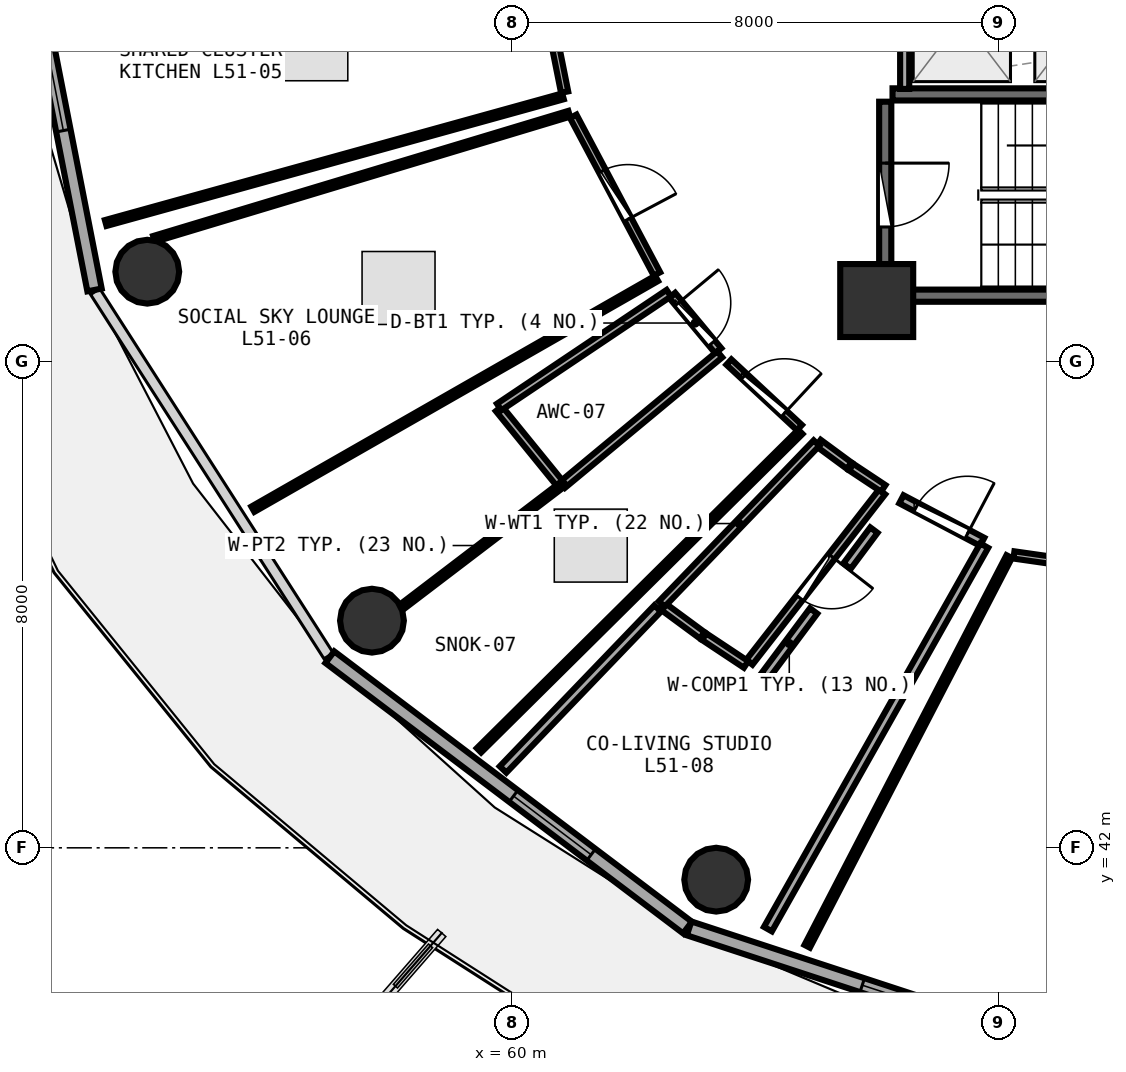
"""IFC4 building model, lengths in metres.
Left out: names, types, materials, properties, quantities, classifications, styles, units other than length and angle.
Written with IfcOpenShell. Run it as: python <this file> out.ifc"""

import sys

from ifc_helpers import new_model, si_unit, direction, frame, frame_2d, origin, origin_2d, place, context, subcontext, project, spatial, rectangle, circle, extrude, element, fill, save


model = new_model("IFC4")
c1 = context("Model", 3, precision=1e-05, world=origin(), true_north=direction((0.0, 1.0)))
c2 = subcontext(c1, "Body", "Model", "MODEL_VIEW")
j1 = project(units=[si_unit("LENGTHUNIT", "METRE"), si_unit("PLANEANGLEUNIT", "RADIAN")], contexts=[c1])
p1 = place(None, origin())
s1 = spatial("IfcSite", under=j1, at=p1, CompositionType="ELEMENT")
p2 = place(p1, origin())
s2 = spatial("IfcBuilding", under=s1, at=p2, CompositionType="ELEMENT")
p3 = place(p2, frame((0.0, 0.0, 200.7)))
s3 = spatial("IfcBuildingStorey", under=s2, at=p3, CompositionType="ELEMENT", Elevation=200.7)
p4 = place(p3, frame((66.0, 51.0, 0.0), z_axis=(0.0, 0.0, 1.0), x_axis=(1.0, 0.0, 0.0)))
e1 = element("IfcColumn", 1, at=p4, inside=s3, PredefinedType="PILASTER", context=c2, shape_type="SweptSolid", body=[
    extrude(rectangle(XDim=1.2, YDim=1.2, at=origin_2d()), origin(), (0.0, 0.0, 1.0), 3.75),
])
for number, where, z_axis, x_axis in (
    (2, (54.003, 51.474, 0.0), (0.0, 0.0, 1.0), (1.0, 0.0, 0.0)),
    (3, (57.698, 45.736, 0.0), (0.0, 0.0, 1.0), (1.0, 0.0, 0.0)),
    (4, (63.36, 41.476, 0.0), (0.0, 0.0, 1.0), (1.0, 0.0, 0.0)),
):
    element("IfcColumn", number, at=place(p3, frame(where, z_axis=z_axis, x_axis=x_axis)), inside=s3, PredefinedType="COLUMN", context=c2, shape_type="SweptSolid", body=[
        extrude(circle(Radius=0.525, at=origin_2d()), origin(), (0.0, 0.0, 1.0), 3.75),
    ])
p5 = place(p3, frame((51.803, 57.985, 0.0), z_axis=(0.0, 0.0, 1.0), x_axis=(0.192069055673, -0.981381413036, 0.0)))
e5 = element("IfcWall", 5, at=p5, inside=s3, PredefinedType="SOLIDWALL", context=c2, shape_type="SweptSolid", body=[
    extrude(rectangle(XDim=6.94, YDim=0.24, at=frame_2d((3.47, 0.0))), origin(), (0.0, 0.0, 1.0), 3.475),
])
p6 = place(p5, frame((2.67, 0.0, 0.85)))
e6 = element("IfcOpeningElement", 6, at=p6, cuts=e5, PredefinedType="OPENING", context=c2, shape_type="SweptSolid", body=[
    extrude(rectangle(XDim=1.6, YDim=1.45, at=frame_2d((0.8, 0.725))), frame((0.0, 0.13, 0.0), z_axis=(0.0, -1.0, 0.0), x_axis=(1.0, 0.0, 0.0)), (0.0, 0.0, 1.0), 0.26),
])
p7 = place(p3, frame((57.006, 45.135, 0.0), z_axis=(0.0, 0.0, 1.0), x_axis=(0.797701674595, -0.603052268338, 0.0)))
e7 = element("IfcWall", 7, at=p7, inside=s3, PredefinedType="SOLIDWALL", context=c2, shape_type="SweptSolid", body=[
    extrude(rectangle(XDim=7.374, YDim=0.24, at=frame_2d((3.687, 0.0))), origin(), (0.0, 0.0, 1.0), 3.475),
])
p8 = place(p7, frame((3.787, 0.0, 0.85)))
e8 = element("IfcOpeningElement", 8, at=p8, cuts=e7, PredefinedType="OPENING", context=c2, shape_type="SweptSolid", body=[
    extrude(rectangle(XDim=1.6, YDim=1.45, at=frame_2d((0.8, 0.725))), frame((0.0, 0.13, 0.0), z_axis=(0.0, -1.0, 0.0), x_axis=(1.0, 0.0, 0.0)), (0.0, 0.0, 1.0), 0.26),
])
p9 = place(p3, frame((62.914, 40.675, 0.0), z_axis=(0.0, 0.0, 1.0), x_axis=(0.95022142767, -0.31157541366, 0.0)))
e9 = element("IfcWall", 9, at=p9, inside=s3, PredefinedType="SOLIDWALL", context=c2, shape_type="SweptSolid", body=[
    extrude(rectangle(XDim=7.594, YDim=0.24, at=frame_2d((3.797, 0.0))), origin(), (0.0, 0.0, 1.0), 3.475),
])
p10 = place(p9, frame((2.997, 0.0, 0.85)))
e10 = element("IfcOpeningElement", 10, at=p10, cuts=e9, PredefinedType="OPENING", context=c2, shape_type="SweptSolid", body=[
    extrude(rectangle(XDim=1.6, YDim=1.45, at=frame_2d((0.8, 0.725))), frame((0.0, 0.13, 0.0), z_axis=(0.0, -1.0, 0.0), x_axis=(1.0, 0.0, 0.0)), (0.0, 0.0, 1.0), 0.26),
])
for number, where, z_axis, x_axis in (
    (11, (66.26, 51.08, 0.0), (0.0, 0.0, 1.0), (1.0, 0.0, 0.0)),
    (12, (73.42, 54.39, 0.0), (0.0, 0.0, 1.0), (-1.0, 0.0, 0.0)),
):
    element("IfcWall", number, at=place(p3, frame(where, z_axis=z_axis, x_axis=x_axis)), inside=s3, PredefinedType="SHEAR", context=c2, shape_type="SweptSolid", body=[
        extrude(rectangle(XDim=7.16, YDim=0.2, at=frame_2d((3.58, 0.0))), origin(), (0.0, 0.0, 1.0), 3.49),
    ])
p11 = place(p3, frame((66.14, 54.27, 0.0), z_axis=(0.0, 0.0, 1.0), x_axis=(0.0, -1.0, 0.0)))
e13 = element("IfcWall", 13, at=p11, inside=s3, PredefinedType="SHEAR", context=c2, shape_type="SweptSolid", body=[
    extrude(rectangle(XDim=3.07, YDim=0.2, at=frame_2d((1.535, 0.0))), origin(), (0.0, 0.0, 1.0), 3.49),
])
p12 = place(p11, frame((1.01, 0.0, 0.0)))
e14 = element("IfcOpeningElement", 14, at=p12, cuts=e13, PredefinedType="OPENING", context=c2, shape_type="SweptSolid", body=[
    extrude(rectangle(XDim=1.05, YDim=2.1, at=frame_2d((0.525, 1.05))), frame((0.0, 0.11, 0.0), z_axis=(0.0, -1.0, 0.0), x_axis=(1.0, 0.0, 0.0)), (0.0, 0.0, 1.0), 0.22),
])
p13 = place(p3, frame((66.46, 54.48, 0.0), z_axis=(0.0, 0.0, 1.0), x_axis=(0.0, 1.0, 0.0)))
e15 = element("IfcWall", 15, at=p13, inside=s3, PredefinedType="PARTITIONING", context=c2, shape_type="SweptSolid", body=[
    extrude(rectangle(XDim=2.29, YDim=0.15, at=frame_2d((1.145, 0.0))), origin(), (0.0, 0.0, 1.0), 3.48),
])
p14 = place(p3, frame((68.256, 46.816, 0.0), z_axis=(0.0, 0.0, 1.0), x_axis=(0.989926410659, -0.141582843167, 0.0)))
e16 = element("IfcWall", 16, at=p14, inside=s3, PredefinedType="PARTITIONING", context=c2, shape_type="SweptSolid", body=[
    extrude(rectangle(XDim=7.408, YDim=0.12, at=frame_2d((3.704, 0.0))), origin(), (0.0, 0.0, 1.0), 3.025),
])
p15 = place(p14, frame((3.254, 0.0, 0.0)))
e17 = element("IfcOpeningElement", 17, at=p15, cuts=e16, PredefinedType="OPENING", context=c2, shape_type="SweptSolid", body=[
    extrude(rectangle(XDim=0.9, YDim=2.08, at=frame_2d((0.45, 1.04))), frame((0.0, 0.07, 0.0), z_axis=(0.0, -1.0, 0.0), x_axis=(1.0, 0.0, 0.0)), (0.0, 0.0, 1.0), 0.14),
])
p16 = place(p3, frame((60.303, 57.253, 0.0), z_axis=(0.0, 0.0, 1.0), x_axis=(0.195904296331, -0.980623019656, 0.0)))
e18 = element("IfcWall", 18, at=p16, inside=s3, PredefinedType="PARTITIONING", context=c2, shape_type="SweptSolid", body=[
    extrude(rectangle(XDim=2.881, YDim=0.12, at=frame_2d((1.441, 0.0))), origin(), (0.0, 0.0, 1.0), 3.48),
])
p17 = place(p16, frame((0.991, 0.0, 0.0)))
e19 = element("IfcOpeningElement", 19, at=p17, cuts=e18, PredefinedType="OPENING", context=c2, shape_type="SweptSolid", body=[
    extrude(rectangle(XDim=0.9, YDim=2.08, at=frame_2d((0.45, 1.04))), frame((0.0, 0.07, 0.0), z_axis=(0.0, -1.0, 0.0), x_axis=(1.0, 0.0, 0.0)), (0.0, 0.0, 1.0), 0.14),
])
p18 = place(p3, frame((61.009, 54.03, 0.0), z_axis=(0.0, 0.0, 1.0), x_axis=(0.468999166779, -0.883198608219, 0.0)))
e20 = element("IfcWall", 20, at=p18, inside=s3, PredefinedType="PARTITIONING", context=c2, shape_type="SweptSolid", body=[
    extrude(rectangle(XDim=2.936, YDim=0.12, at=frame_2d((1.468, 0.0))), origin(), (0.0, 0.0, 1.0), 3.235),
])
p19 = place(p18, frame((1.018, 0.0, 0.0)))
e21 = element("IfcOpeningElement", 21, at=p19, cuts=e20, PredefinedType="OPENING", context=c2, shape_type="SweptSolid", body=[
    extrude(rectangle(XDim=0.9, YDim=2.08, at=frame_2d((0.45, 1.04))), frame((0.0, 0.07, 0.0), z_axis=(0.0, -1.0, 0.0), x_axis=(1.0, 0.0, 0.0)), (0.0, 0.0, 1.0), 0.14),
])
p20 = place(p3, frame((62.635, 51.086, 0.0), z_axis=(0.0, 0.0, 1.0), x_axis=(0.639759255057, -0.768575367526, 0.0)))
e22 = element("IfcWall", 22, at=p20, inside=s3, PredefinedType="PLUMBINGWALL", context=c2, shape_type="SweptSolid", body=[
    extrude(rectangle(XDim=1.187, YDim=0.13, at=frame_2d((0.593, 0.0))), origin(), (0.0, 0.0, 1.0), 3.025),
])
p21 = place(p20, frame((0.163, 0.0, 0.0)))
e23 = element("IfcOpeningElement", 23, at=p21, cuts=e22, PredefinedType="OPENING", context=c2, shape_type="SweptSolid", body=[
    extrude(rectangle(XDim=0.86, YDim=2.05, at=frame_2d((0.43, 1.025))), frame((0.0, 0.075, 0.0), z_axis=(0.0, -1.0, 0.0), x_axis=(1.0, 0.0, 0.0)), (0.0, 0.0, 1.0), 0.15),
])
p22 = place(p3, frame((63.569, 49.988, 0.0), z_axis=(0.0, 0.0, 1.0), x_axis=(0.732453034456, -0.680817561698, 0.0)))
e24 = element("IfcWall", 24, at=p22, inside=s3, PredefinedType="PARTITIONING", context=c2, shape_type="SweptSolid", body=[
    extrude(rectangle(XDim=1.584, YDim=0.12, at=frame_2d((0.792, 0.0))), origin(), (0.0, 0.0, 1.0), 3.025),
])
p23 = place(p22, frame((0.342, 0.0, 0.0)))
e25 = element("IfcOpeningElement", 25, at=p23, cuts=e24, PredefinedType="OPENING", context=c2, shape_type="SweptSolid", body=[
    extrude(rectangle(XDim=0.9, YDim=2.08, at=frame_2d((0.45, 1.04))), frame((0.0, 0.07, 0.0), z_axis=(0.0, -1.0, 0.0), x_axis=(1.0, 0.0, 0.0)), (0.0, 0.0, 1.0), 0.14),
])
p24 = place(p3, frame((66.088, 47.853, 0.0), z_axis=(0.0, 0.0, 1.0), x_axis=(-0.614711227896, -0.788752246462, 0.0)))
e26 = element("IfcWall", 26, at=p24, inside=s3, PredefinedType="PLUMBINGWALL", context=c2, shape_type="SweptSolid", body=[
    extrude(rectangle(XDim=3.552, YDim=0.13, at=frame_2d((1.776, 0.0))), origin(), (0.0, 0.0, 1.0), 3.025),
])
p25 = place(p24, frame((1.346, 0.0, 0.0)))
e27 = element("IfcOpeningElement", 27, at=p25, cuts=e26, PredefinedType="OPENING", context=c2, shape_type="SweptSolid", body=[
    extrude(rectangle(XDim=0.86, YDim=2.05, at=frame_2d((0.43, 1.025))), frame((0.0, 0.075, 0.0), z_axis=(0.0, -1.0, 0.0), x_axis=(1.0, 0.0, 0.0)), (0.0, 0.0, 1.0), 0.15),
])
p26 = place(p3, frame((66.406, 47.732, 0.0), z_axis=(0.0, 0.0, 1.0), x_axis=(0.884766555002, -0.466034487083, 0.0)))
e28 = element("IfcWall", 28, at=p26, inside=s3, PredefinedType="PARTITIONING", context=c2, shape_type="SweptSolid", body=[
    extrude(rectangle(XDim=1.502, YDim=0.15, at=frame_2d((0.751, 0.0))), origin(), (0.0, 0.0, 1.0), 3.235),
])
p27 = place(p26, frame((0.276, 0.0, 0.0)))
e29 = element("IfcOpeningElement", 29, at=p27, cuts=e28, PredefinedType="OPENING", context=c2, shape_type="SweptSolid", body=[
    extrude(rectangle(XDim=0.95, YDim=2.08, at=frame_2d((0.475, 1.04))), frame((0.0, 0.085, 0.0), z_axis=(0.0, -1.0, 0.0), x_axis=(1.0, 0.0, 0.0)), (0.0, 0.0, 1.0), 0.17),
])
p28 = place(p3, frame((64.856, 40.381, 0.0), z_axis=(0.0, 0.0, 1.0), x_axis=(0.460220418691, 0.887804689231, 0.0)))
e30 = element("IfcWall", 30, at=p28, inside=s3, PredefinedType="PARTITIONING", context=c2, shape_type="SweptSolid", body=[
    extrude(rectangle(XDim=7.219, YDim=0.1, at=frame_2d((3.609, 0.0))), origin(), (0.0, 0.0, 1.0), 3.075),
])
p29 = place(p3, frame((60.841, 54.358, 0.0), z_axis=(0.0, 0.0, 1.0), x_axis=(-0.963696964369, -0.266998428582, 0.0)))
e31 = element("IfcWall", 31, at=p29, inside=s3, PredefinedType="PARTITIONING", context=c2, shape_type="SweptSolid", body=[
    extrude(rectangle(XDim=7.804, YDim=0.1, at=frame_2d((3.902, 0.0))), origin(), (0.0, 0.0, 1.0), 3.075),
])
p30 = place(p3, frame((62.379, 51.364, 0.0), z_axis=(0.0, 0.0, 1.0), x_axis=(-0.868127220156, -0.496341746808, 0.0)))
e32 = element("IfcWall", 32, at=p30, inside=s3, PredefinedType="PARTITIONING", context=c2, shape_type="SweptSolid", body=[
    extrude(rectangle(XDim=7.648, YDim=0.1, at=frame_2d((3.824, 0.0))), origin(), (0.0, 0.0, 1.0), 3.025),
])
p31 = place(p3, frame((54.114, 52.013, 0.0), z_axis=(0.0, 0.0, 1.0), x_axis=(0.957454305291, 0.288584915198, 0.0)))
e33 = element("IfcWall", 33, at=p31, inside=s3, PredefinedType="PARTITIONING", context=c2, shape_type="SweptSolid", body=[
    extrude(rectangle(XDim=7.133, YDim=0.1, at=frame_2d((3.566, 0.0))), origin(), (0.0, 0.0, 1.0), 3.075),
])
p32 = place(p3, frame((63.417, 50.115, 0.0), z_axis=(0.0, 0.0, 1.0), x_axis=(-0.76963081868, -0.638489156477, 0.0)))
e34 = element("IfcWall", 34, at=p32, inside=s3, PredefinedType="PLUMBINGWALL", context=c2, shape_type="SweptSolid", body=[
    extrude(rectangle(XDim=3.36, YDim=0.13, at=frame_2d((1.68, 0.0))), origin(), (0.0, 0.0, 1.0), 3.175),
])
p33 = place(p3, frame((60.803, 47.972, 0.0), z_axis=(0.0, 0.0, 1.0), x_axis=(-0.631048835574, 0.775743106396, 0.0)))
e35 = element("IfcWall", 35, at=p33, inside=s3, PredefinedType="PLUMBINGWALL", context=c2, shape_type="SweptSolid", body=[
    extrude(rectangle(XDim=1.611, YDim=0.13, at=frame_2d((0.806, 0.0))), origin(), (0.0, 0.0, 1.0), 3.175),
])
p34 = place(p3, frame((59.791, 49.249, 0.0), z_axis=(0.0, 0.0, 1.0), x_axis=(0.830403176275, 0.557162960751, 0.0)))
e36 = element("IfcWall", 36, at=p34, inside=s3, PredefinedType="PLUMBINGWALL", context=c2, shape_type="SweptSolid", body=[
    extrude(rectangle(XDim=3.36, YDim=0.13, at=frame_2d((1.68, 0.0))), origin(), (0.0, 0.0, 1.0), 3.025),
])
p35 = place(p3, frame((64.745, 48.841, 0.0), z_axis=(0.0, 0.0, 1.0), x_axis=(-0.710363664194, -0.703834827635, 0.0)))
e37 = element("IfcWall", 37, at=p35, inside=s3, PredefinedType="PARTITIONING", context=c2, shape_type="SweptSolid", body=[
    extrude(rectangle(XDim=7.441, YDim=0.1, at=frame_2d((3.721, 0.0))), origin(), (0.0, 0.0, 1.0), 3.075),
])
p36 = place(p3, frame((58.197, 45.969, 0.0), z_axis=(0.0, 0.0, 1.0), x_axis=(0.79535379018, 0.606145484555, 0.0)))
e38 = element("IfcWall", 38, at=p36, inside=s3, PredefinedType="PARTITIONING", context=c2, shape_type="SweptSolid", body=[
    extrude(rectangle(XDim=3.308, YDim=0.1, at=frame_2d((1.654, 0.0))), origin(), (0.0, 0.0, 1.0), 3.025),
])
p37 = place(p3, frame((65.04, 48.658, 0.0), z_axis=(0.0, 0.0, 1.0), x_axis=(0.804987739936, -0.593291444867, 0.0)))
e39 = element("IfcWall", 39, at=p37, inside=s3, PredefinedType="PLUMBINGWALL", context=c2, shape_type="SweptSolid", body=[
    extrude(rectangle(XDim=0.631, YDim=0.13, at=frame_2d((0.315, 0.0))), origin(), (0.0, 0.0, 1.0), 3.025),
])
p38 = place(p3, frame((65.581, 48.261, 0.0), z_axis=(0.0, 0.0, 1.0), x_axis=(0.83341242139, -0.55265155014, 0.0)))
e40 = element("IfcWall", 40, at=p38, inside=s3, PredefinedType="PLUMBINGWALL", context=c2, shape_type="SweptSolid", body=[
    extrude(rectangle(XDim=0.633, YDim=0.13, at=frame_2d((0.316, 0.0))), origin(), (0.0, 0.0, 1.0), 3.48),
])
p39 = place(p3, frame((63.851, 45.015, 0.0), z_axis=(0.0, 0.0, 1.0), x_axis=(-0.833365951339, 0.552721621749, 0.0)))
e41 = element("IfcWall", 41, at=p39, inside=s3, PredefinedType="PLUMBINGWALL", context=c2, shape_type="SweptSolid", body=[
    extrude(rectangle(XDim=0.826, YDim=0.13, at=frame_2d((0.413, 0.0))), origin(), (0.0, 0.0, 1.0), 3.48),
])
p40 = place(p3, frame((63.13, 45.495, 0.0), z_axis=(0.0, 0.0, 1.0), x_axis=(-0.805130367536, 0.593097876638, 0.0)))
e42 = element("IfcWall", 42, at=p40, inside=s3, PredefinedType="PLUMBINGWALL", context=c2, shape_type="SweptSolid", body=[
    extrude(rectangle(XDim=0.823, YDim=0.13, at=frame_2d((0.412, 0.0))), origin(), (0.0, 0.0, 1.0), 3.48),
])
p41 = place(p3, frame((62.465, 46.01, 0.0), z_axis=(0.0, 0.0, 1.0), x_axis=(0.693241598237, 0.720705270186, 0.0)))
e43 = element("IfcWall", 43, at=p41, inside=s3, PredefinedType="PLUMBINGWALL", context=c2, shape_type="SweptSolid", body=[
    extrude(rectangle(XDim=3.671, YDim=0.13, at=frame_2d((1.836, 0.0))), origin(), (0.0, 0.0, 1.0), 3.175),
])
p42 = place(p3, frame((67.768, 46.969, 0.0), z_axis=(0.0, 0.0, 1.0), x_axis=(-0.491338239217, -0.870968848285, 0.0)))
e44 = element("IfcWall", 44, at=p42, inside=s3, PredefinedType="PARTITIONING", context=c2, shape_type="SweptSolid", body=[
    extrude(rectangle(XDim=7.241, YDim=0.15, at=frame_2d((3.62, 0.0))), origin(), (0.0, 0.0, 1.0), 3.075),
])
p43 = place(p3, frame((59.855, 43.288, 0.0), z_axis=(0.0, 0.0, 1.0), x_axis=(0.692562282737, 0.72135808343, 0.0)))
e45 = element("IfcWall", 45, at=p43, inside=s3, PredefinedType="PARTITIONING", context=c2, shape_type="SweptSolid", body=[
    extrude(rectangle(XDim=3.671, YDim=0.15, at=frame_2d((1.835, 0.0))), origin(), (0.0, 0.0, 1.0), 3.075),
])
p44 = place(p3, frame((64.162, 44.823, 0.0), z_axis=(0.0, 0.0, 1.0), x_axis=(0.597925227294, 0.801551883889, 0.0)))
e46 = element("IfcWall", 46, at=p44, inside=s3, PredefinedType="PARTITIONING", context=c2, shape_type="SweptSolid", body=[
    extrude(rectangle(XDim=1.338, YDim=0.15, at=frame_2d((0.669, 0.0))), origin(), (0.0, 0.0, 1.0), 3.025),
])
p45 = place(p3, frame((65.512, 46.633, 0.0), z_axis=(0.0, 0.0, 1.0), x_axis=(0.598093921347, 0.801426017327, 0.0)))
e47 = element("IfcWall", 47, at=p45, inside=s3, PredefinedType="PARTITIONING", context=c2, shape_type="SweptSolid", body=[
    extrude(rectangle(XDim=0.739, YDim=0.15, at=frame_2d((0.369, 0.0))), origin(), (0.0, 0.0, 1.0), 3.235),
])
p46 = place(p6, origin())
e48 = element("IfcWindow", 48, at=p46, inside=s3, PartitioningType="SINGLE_PANEL", PredefinedType="WINDOW", context=c2, shape_type="SweptSolid", body=[
    extrude(rectangle(XDim=1.6, YDim=1.45, at=frame_2d((0.8, 0.725))), frame((0.0, 0.03, 0.0), z_axis=(0.0, -1.0, 0.0), x_axis=(1.0, 0.0, 0.0)), (0.0, 0.0, 1.0), 0.06),
])
fill(e6, e48)
p47 = place(p8, origin())
e49 = element("IfcWindow", 49, at=p47, inside=s3, PartitioningType="SINGLE_PANEL", PredefinedType="WINDOW", context=c2, shape_type="SweptSolid", body=[
    extrude(rectangle(XDim=1.6, YDim=1.45, at=frame_2d((0.8, 0.725))), frame((0.0, 0.03, 0.0), z_axis=(0.0, -1.0, 0.0), x_axis=(1.0, 0.0, 0.0)), (0.0, 0.0, 1.0), 0.06),
])
fill(e8, e49)
p48 = place(p10, origin())
e50 = element("IfcWindow", 50, at=p48, inside=s3, PartitioningType="SINGLE_PANEL", PredefinedType="WINDOW", context=c2, shape_type="SweptSolid", body=[
    extrude(rectangle(XDim=1.6, YDim=1.45, at=frame_2d((0.8, 0.725))), frame((0.0, 0.03, 0.0), z_axis=(0.0, -1.0, 0.0), x_axis=(1.0, 0.0, 0.0)), (0.0, 0.0, 1.0), 0.06),
])
fill(e10, e50)
p49 = place(p12, origin())
e51 = element("IfcDoor", 51, at=p49, inside=s3, OperationType="SINGLE_SWING_LEFT", PredefinedType="DOOR", context=c2, shape_type="SweptSolid", body=[
    extrude(rectangle(XDim=1.05, YDim=2.1, at=frame_2d((0.525, 1.05))), frame((0.0, 0.025, 0.0), z_axis=(0.0, -1.0, 0.0), x_axis=(1.0, 0.0, 0.0)), (0.0, 0.0, 1.0), 0.05),
])
fill(e14, e51)
p50 = place(p19, origin())
e52 = element("IfcDoor", 52, at=p50, inside=s3, OperationType="SINGLE_SWING_RIGHT", PredefinedType="DOOR", context=c2, shape_type="SweptSolid", body=[
    extrude(rectangle(XDim=0.9, YDim=2.08, at=frame_2d((0.45, 1.04))), frame((0.0, 0.025, 0.0), z_axis=(0.0, -1.0, 0.0), x_axis=(1.0, 0.0, 0.0)), (0.0, 0.0, 1.0), 0.05),
])
fill(e21, e52)
p51 = place(p21, origin())
e53 = element("IfcDoor", 53, at=p51, inside=s3, OperationType="SINGLE_SWING_LEFT", PredefinedType="DOOR", context=c2, shape_type="SweptSolid", body=[
    extrude(rectangle(XDim=0.86, YDim=2.05, at=frame_2d((0.43, 1.025))), frame((0.0, 0.025, 0.0), z_axis=(0.0, -1.0, 0.0), x_axis=(1.0, 0.0, 0.0)), (0.0, 0.0, 1.0), 0.05),
])
fill(e23, e53)
p52 = place(p23, origin())
e54 = element("IfcDoor", 54, at=p52, inside=s3, OperationType="SINGLE_SWING_RIGHT", PredefinedType="DOOR", context=c2, shape_type="SweptSolid", body=[
    extrude(rectangle(XDim=0.9, YDim=2.08, at=frame_2d((0.45, 1.04))), frame((0.0, 0.025, 0.0), z_axis=(0.0, -1.0, 0.0), x_axis=(1.0, 0.0, 0.0)), (0.0, 0.0, 1.0), 0.05),
])
fill(e25, e54)
p53 = place(p25, origin())
e55 = element("IfcDoor", 55, at=p53, inside=s3, OperationType="SINGLE_SWING_LEFT", PredefinedType="DOOR", context=c2, shape_type="SweptSolid", body=[
    extrude(rectangle(XDim=0.86, YDim=2.05, at=frame_2d((0.43, 1.025))), frame((0.0, 0.025, 0.0), z_axis=(0.0, -1.0, 0.0), x_axis=(1.0, 0.0, 0.0)), (0.0, 0.0, 1.0), 0.05),
])
fill(e27, e55)
p54 = place(p27, origin())
e56 = element("IfcDoor", 56, at=p54, inside=s3, OperationType="SINGLE_SWING_RIGHT", PredefinedType="DOOR", context=c2, shape_type="SweptSolid", body=[
    extrude(rectangle(XDim=0.95, YDim=2.08, at=frame_2d((0.475, 1.04))), frame((0.0, 0.025, 0.0), z_axis=(0.0, -1.0, 0.0), x_axis=(1.0, 0.0, 0.0)), (0.0, 0.0, 1.0), 0.05),
])
fill(e29, e56)
save(model, sys.argv[1])
